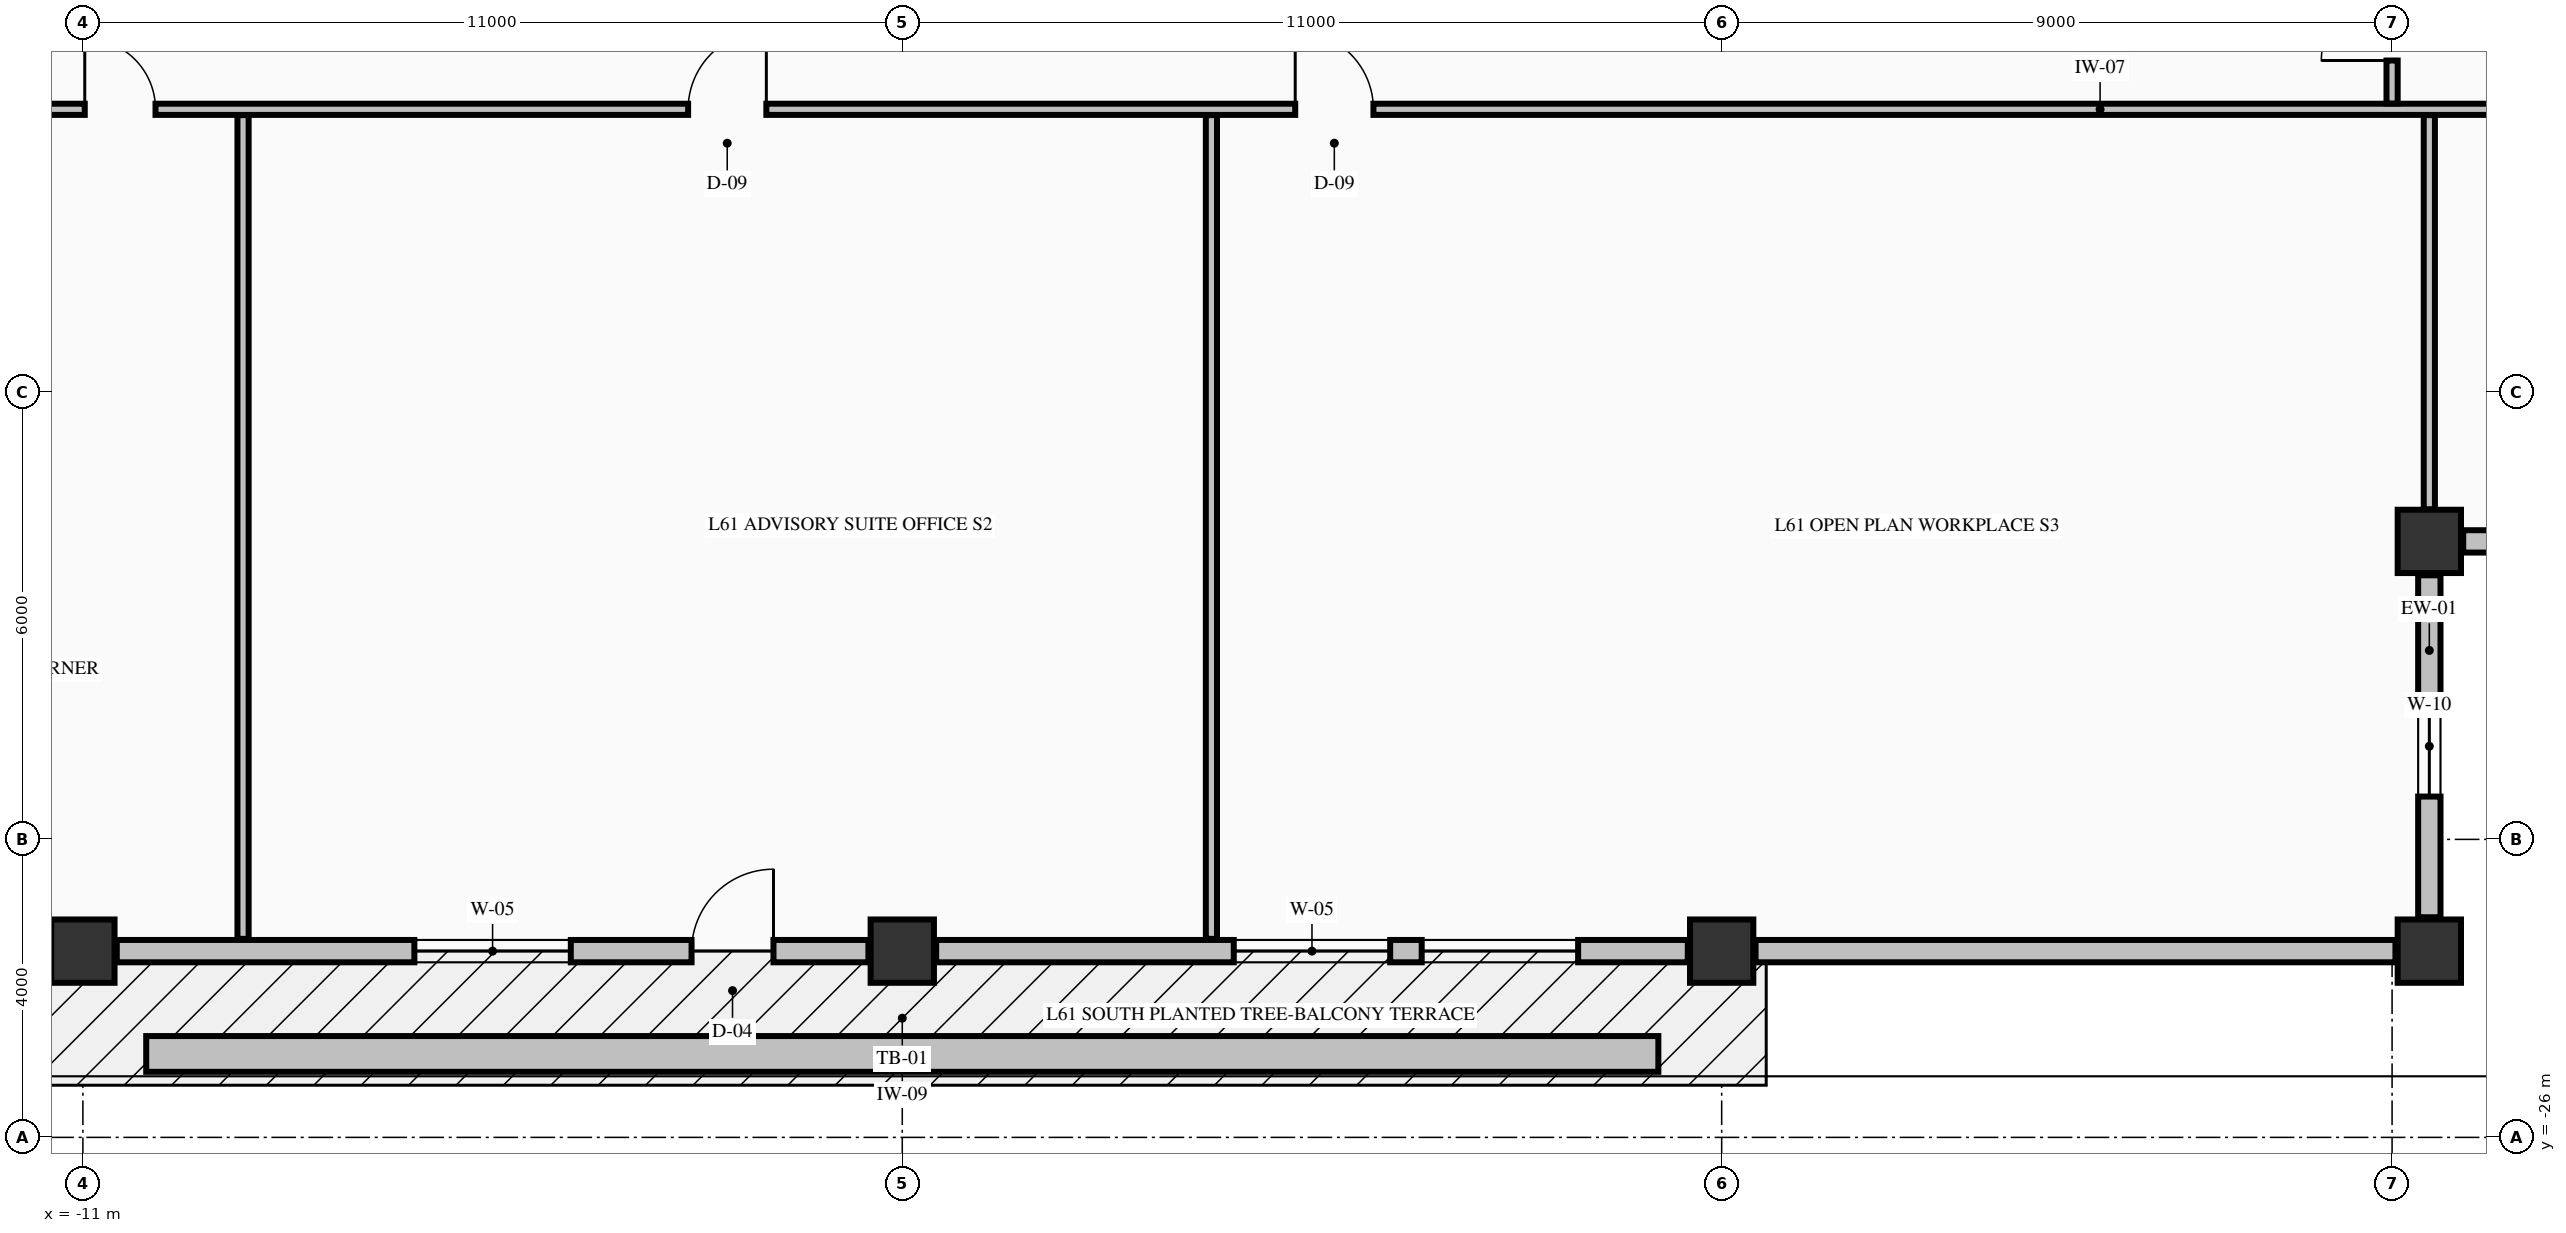
"""IFC4 building model, lengths in metres.
Left out: names, types, materials, properties, quantities, classifications, styles, units other than length and angle.
Written with IfcOpenShell. Run it as: python <this file> out.ifc"""

import sys

from ifc_helpers import new_model, si_unit, direction, frame, frame_2d, origin, origin_2d, place, context, subcontext, project, spatial, rectangle, extrude, element, fill, save


model = new_model("IFC4")
c1 = context("Model", 3, precision=1e-05, world=origin(), true_north=direction((0.0, 1.0)))
c2 = subcontext(c1, "Body", "Model", "MODEL_VIEW")
j1 = project(units=[si_unit("LENGTHUNIT", "METRE"), si_unit("PLANEANGLEUNIT", "RADIAN")], contexts=[c1])
p1 = place(None, origin())
s1 = spatial("IfcSite", under=j1, at=p1, CompositionType="ELEMENT")
p2 = place(p1, origin())
s2 = spatial("IfcBuilding", under=s1, at=p2, CompositionType="ELEMENT")
p3 = place(p2, frame((0.0, 0.0, 233.28)))
s3 = spatial("IfcBuildingStorey", under=s2, at=p3, CompositionType="ELEMENT", Elevation=233.28)
for number, where, z_axis, x_axis in (
    (1, (-11.0, -23.5, -0.25), (0.0, 0.0, 1.0), (1.0, 0.0, 0.0)),
    (2, (0.0, -23.5, -0.25), (0.0, 0.0, 1.0), (1.0, 0.0, 0.0)),
    (3, (11.0, -23.5, -0.25), (0.0, 0.0, 1.0), (1.0, 0.0, 0.0)),
    (4, (20.5, -23.5, -0.25), (0.0, 0.0, 1.0), (1.0, 0.0, 0.0)),
    (5, (20.5, -18.0, -0.25), (0.0, 0.0, 1.0), (1.0, 0.0, 0.0)),
):
    element("IfcColumn", number, at=place(p3, frame(where, z_axis=z_axis, x_axis=x_axis)), inside=s3, PredefinedType="COLUMN", context=c2, shape_type="SweptSolid", body=[
        extrude(rectangle(XDim=0.85, YDim=0.85, at=origin_2d()), origin(), (0.0, 0.0, 1.0), 3.23),
    ])
p4 = place(p3, frame((20.5, -23.045, 0.0), z_axis=(0.0, 0.0, 1.0), x_axis=(0.0, 1.0, 0.0)))
e6 = element("IfcWall", 6, at=p4, inside=s3, PredefinedType="STANDARD", context=c2, shape_type="SweptSolid", body=[
    extrude(rectangle(XDim=4.59, YDim=0.3, at=frame_2d((2.295, 0.0))), origin(), (0.0, 0.0, 1.0), 2.372),
])
p5 = place(p4, frame((1.62, 0.0, 0.68)))
e7 = element("IfcOpeningElement", 7, at=p5, cuts=e6, PredefinedType="OPENING", context=c2, shape_type="SweptSolid", body=[
    extrude(rectangle(XDim=1.35, YDim=1.42, at=frame_2d((0.675, 0.71))), frame((0.0, 0.16, 0.0), z_axis=(0.0, -1.0, 0.0), x_axis=(1.0, 0.0, 0.0)), (0.0, 0.0, 1.0), 0.32),
])
p6 = place(p3, frame((20.955, -18.0, 0.0), z_axis=(0.0, 0.0, 1.0), x_axis=(1.0, 0.0, 0.0)))
e8 = element("IfcWall", 8, at=p6, inside=s3, PredefinedType="STANDARD", context=c2, shape_type="SweptSolid", body=[
    extrude(rectangle(XDim=4.59, YDim=0.3, at=frame_2d((2.295, 0.0))), origin(), (0.0, 0.0, 1.0), 2.372),
])
p7 = place(p6, frame((1.62, 0.0, 0.68)))
e9 = element("IfcOpeningElement", 9, at=p7, cuts=e8, PredefinedType="OPENING", context=c2, shape_type="SweptSolid", body=[
    extrude(rectangle(XDim=1.35, YDim=1.42, at=frame_2d((0.675, 0.71))), frame((0.0, 0.16, 0.0), z_axis=(0.0, -1.0, 0.0), x_axis=(1.0, 0.0, 0.0)), (0.0, 0.0, 1.0), 0.32),
])
p8 = place(p3, frame((-10.545, -23.5, 0.0), z_axis=(0.0, 0.0, 1.0), x_axis=(1.0, 0.0, 0.0)))
e10 = element("IfcWall", 10, at=p8, inside=s3, PredefinedType="STANDARD", context=c2, shape_type="SweptSolid", body=[
    extrude(rectangle(XDim=10.09, YDim=0.3, at=frame_2d((5.045, 0.0))), origin(), (0.0, 0.0, 1.0), 2.372),
])
p9 = place(p8, frame((7.716, 0.0, 0.0)))
e11 = element("IfcOpeningElement", 11, at=p9, cuts=e10, PredefinedType="OPENING", context=c2, shape_type="SweptSolid", body=[
    extrude(rectangle(XDim=1.1, YDim=2.15, at=frame_2d((0.55, 1.075))), frame((0.0, 0.16, 0.0), z_axis=(0.0, -1.0, 0.0), x_axis=(1.0, 0.0, 0.0)), (0.0, 0.0, 1.0), 0.32),
])
p10 = place(p8, frame((3.995, 0.0, 0.7)))
e12 = element("IfcOpeningElement", 12, at=p10, cuts=e10, PredefinedType="OPENING", context=c2, shape_type="SweptSolid", body=[
    extrude(rectangle(XDim=2.1, YDim=1.5, at=frame_2d((1.05, 0.75))), frame((0.0, 0.16, 0.0), z_axis=(0.0, -1.0, 0.0), x_axis=(1.0, 0.0, 0.0)), (0.0, 0.0, 1.0), 0.32),
])
p11 = place(p3, frame((0.455, -23.5, 0.0), z_axis=(0.0, 0.0, 1.0), x_axis=(1.0, 0.0, 0.0)))
e13 = element("IfcWall", 13, at=p11, inside=s3, PredefinedType="STANDARD", context=c2, shape_type="SweptSolid", body=[
    extrude(rectangle(XDim=10.09, YDim=0.3, at=frame_2d((5.045, 0.0))), origin(), (0.0, 0.0, 1.0), 2.372),
])
p12 = place(p11, frame((3.995, 0.0, 0.7)))
e14 = element("IfcOpeningElement", 14, at=p12, cuts=e13, PredefinedType="OPENING", context=c2, shape_type="SweptSolid", body=[
    extrude(rectangle(XDim=2.1, YDim=1.5, at=frame_2d((1.05, 0.75))), frame((0.0, 0.16, 0.0), z_axis=(0.0, -1.0, 0.0), x_axis=(1.0, 0.0, 0.0)), (0.0, 0.0, 1.0), 0.32),
])
p13 = place(p11, frame((6.518, 0.0, 0.7)))
e15 = element("IfcOpeningElement", 15, at=p13, cuts=e13, PredefinedType="OPENING", context=c2, shape_type="SweptSolid", body=[
    extrude(rectangle(XDim=2.1, YDim=1.5, at=frame_2d((1.05, 0.75))), frame((0.0, 0.16, 0.0), z_axis=(0.0, -1.0, 0.0), x_axis=(1.0, 0.0, 0.0)), (0.0, 0.0, 1.0), 0.32),
])
p14 = place(p3, frame((11.455, -23.5, 0.0), z_axis=(0.0, 0.0, 1.0), x_axis=(1.0, 0.0, 0.0)))
e16 = element("IfcWall", 16, at=p14, inside=s3, PredefinedType="STANDARD", context=c2, shape_type="SweptSolid", body=[
    extrude(rectangle(XDim=8.59, YDim=0.3, at=frame_2d((4.295, 0.0))), origin(), (0.0, 0.0, 1.0), 2.372),
])
p15 = place(p3, frame((-20.075, -12.2, 0.0), z_axis=(0.0, 0.0, 1.0), x_axis=(1.0, 0.0, 0.0)))
e17 = element("IfcWall", 17, at=p15, inside=s3, PredefinedType="PARTITIONING", context=c2, shape_type="SweptSolid", body=[
    extrude(rectangle(XDim=45.91, YDim=0.15, at=frame_2d((22.955, 0.0))), origin(), (0.0, 0.0, 1.0), 2.98),
])
p16 = place(p15, frame((9.1, 0.0, 0.0)))
e18 = element("IfcOpeningElement", 18, at=p16, cuts=e17, PredefinedType="OPENING", context=c2, shape_type="SweptSolid", body=[
    extrude(rectangle(XDim=0.95, YDim=2.15, at=frame_2d((0.475, 1.075))), frame((0.0, 0.085, 0.0), z_axis=(0.0, -1.0, 0.0), x_axis=(1.0, 0.0, 0.0)), (0.0, 0.0, 1.0), 0.17),
])
p17 = place(p15, frame((17.2, 0.0, 0.0)))
e19 = element("IfcOpeningElement", 19, at=p17, cuts=e17, PredefinedType="OPENING", context=c2, shape_type="SweptSolid", body=[
    extrude(rectangle(XDim=1.05, YDim=2.15, at=frame_2d((0.525, 1.075))), frame((0.0, 0.085, 0.0), z_axis=(0.0, -1.0, 0.0), x_axis=(1.0, 0.0, 0.0)), (0.0, 0.0, 1.0), 0.17),
])
p18 = place(p15, frame((25.35, 0.0, 0.0)))
e20 = element("IfcOpeningElement", 20, at=p18, cuts=e17, PredefinedType="OPENING", context=c2, shape_type="SweptSolid", body=[
    extrude(rectangle(XDim=1.05, YDim=2.15, at=frame_2d((0.525, 1.075))), frame((0.0, 0.085, 0.0), z_axis=(0.0, -1.0, 0.0), x_axis=(1.0, 0.0, 0.0)), (0.0, 0.0, 1.0), 0.17),
])
for number, where, z_axis, x_axis in (
    (21, (-8.85, -23.335, 0.0), (0.0, 0.0, 1.0), (0.0, 1.0, 0.0)),
    (22, (4.15, -23.335, 0.0), (0.0, 0.0, 1.0), (0.0, 1.0, 0.0)),
):
    element("IfcWall", number, at=place(p3, frame(where, z_axis=z_axis, x_axis=x_axis)), inside=s3, PredefinedType="PARTITIONING", context=c2, shape_type="SweptSolid", body=[
        extrude(rectangle(XDim=11.057, YDim=0.15, at=frame_2d((5.528, 0.0))), origin(), (0.0, 0.0, 1.0), 2.98),
    ])
p19 = place(p3, frame((20.0, -12.122, 0.0), z_axis=(0.0, 0.0, 1.0), x_axis=(0.0, 1.0, 0.0)))
e23 = element("IfcWall", 23, at=p19, inside=s3, PredefinedType="PARTITIONING", context=c2, shape_type="SweptSolid", body=[
    extrude(rectangle(XDim=1.816, YDim=0.15, at=frame_2d((0.908, 0.0))), origin(), (0.0, 0.0, 1.0), 2.98),
])
p20 = place(p19, frame((0.577, 0.0, 0.0)))
e24 = element("IfcOpeningElement", 24, at=p20, cuts=e23, PredefinedType="OPENING", context=c2, shape_type="SweptSolid", body=[
    extrude(rectangle(XDim=0.95, YDim=2.15, at=frame_2d((0.475, 1.075))), frame((0.0, 0.085, 0.0), z_axis=(0.0, -1.0, 0.0), x_axis=(1.0, 0.0, 0.0)), (0.0, 0.0, 1.0), 0.17),
])
p21 = place(p3, frame((20.5, -17.569, 0.0), z_axis=(0.0, 0.0, 1.0), x_axis=(0.0, 1.0, 0.0)))
e25 = element("IfcWall", 25, at=p21, inside=s3, PredefinedType="PARTITIONING", context=c2, shape_type="SweptSolid", body=[
    extrude(rectangle(XDim=5.291, YDim=0.15, at=frame_2d((2.646, 0.0))), origin(), (0.0, 0.0, 1.0), 2.98),
])
p22 = place(p3, frame((-10.15, -24.88, -0.04), z_axis=(0.0, 0.0, 1.0), x_axis=(1.0, 0.0, 0.0)))
e26 = element("IfcWall", 26, at=p22, inside=s3, PredefinedType="PARAPET", context=c2, shape_type="SweptSolid", body=[
    extrude(rectangle(XDim=20.3, YDim=0.48, at=frame_2d((10.15, 0.0))), origin(), (0.0, 0.0, 1.0), 0.52),
])
p23 = place(p5, origin())
e27 = element("IfcWindow", 27, at=p23, inside=s3, PartitioningType="SINGLE_PANEL", PredefinedType="WINDOW", context=c2, shape_type="SweptSolid", body=[
    extrude(rectangle(XDim=1.35, YDim=1.42, at=frame_2d((0.675, 0.71))), frame((0.0, 0.03, 0.0), z_axis=(0.0, -1.0, 0.0), x_axis=(1.0, 0.0, 0.0)), (0.0, 0.0, 1.0), 0.06),
])
fill(e7, e27)
p24 = place(p9, origin())
e28 = element("IfcDoor", 28, at=p24, inside=s3, OperationType="SINGLE_SWING_RIGHT", PredefinedType="DOOR", context=c2, shape_type="SweptSolid", body=[
    extrude(rectangle(XDim=1.1, YDim=2.15, at=frame_2d((0.55, 1.075))), frame((0.0, 0.025, 0.0), z_axis=(0.0, -1.0, 0.0), x_axis=(1.0, 0.0, 0.0)), (0.0, 0.0, 1.0), 0.05),
])
fill(e11, e28)
p25 = place(p10, origin())
e29 = element("IfcWindow", 29, at=p25, inside=s3, PartitioningType="SINGLE_PANEL", PredefinedType="WINDOW", context=c2, shape_type="SweptSolid", body=[
    extrude(rectangle(XDim=2.1, YDim=1.5, at=frame_2d((1.05, 0.75))), frame((0.0, 0.03, 0.0), z_axis=(0.0, -1.0, 0.0), x_axis=(1.0, 0.0, 0.0)), (0.0, 0.0, 1.0), 0.06),
])
fill(e12, e29)
p26 = place(p12, origin())
e30 = element("IfcWindow", 30, at=p26, inside=s3, PartitioningType="SINGLE_PANEL", PredefinedType="WINDOW", context=c2, shape_type="SweptSolid", body=[
    extrude(rectangle(XDim=2.1, YDim=1.5, at=frame_2d((1.05, 0.75))), frame((0.0, 0.03, 0.0), z_axis=(0.0, -1.0, 0.0), x_axis=(1.0, 0.0, 0.0)), (0.0, 0.0, 1.0), 0.06),
])
fill(e14, e30)
p27 = place(p13, origin())
e31 = element("IfcWindow", 31, at=p27, inside=s3, PartitioningType="SINGLE_PANEL", PredefinedType="WINDOW", context=c2, shape_type="SweptSolid", body=[
    extrude(rectangle(XDim=2.1, YDim=1.5, at=frame_2d((1.05, 0.75))), frame((0.0, 0.03, 0.0), z_axis=(0.0, -1.0, 0.0), x_axis=(1.0, 0.0, 0.0)), (0.0, 0.0, 1.0), 0.06),
])
fill(e15, e31)
p28 = place(p16, origin())
e32 = element("IfcDoor", 32, at=p28, inside=s3, OperationType="SINGLE_SWING_LEFT", PredefinedType="DOOR", context=c2, shape_type="SweptSolid", body=[
    extrude(rectangle(XDim=0.95, YDim=2.15, at=frame_2d((0.475, 1.075))), frame((0.0, 0.025, 0.0), z_axis=(0.0, -1.0, 0.0), x_axis=(1.0, 0.0, 0.0)), (0.0, 0.0, 1.0), 0.05),
])
fill(e18, e32)
p29 = place(p17, origin())
e33 = element("IfcDoor", 33, at=p29, inside=s3, OperationType="SINGLE_SWING_RIGHT", PredefinedType="DOOR", context=c2, shape_type="SweptSolid", body=[
    extrude(rectangle(XDim=1.05, YDim=2.15, at=frame_2d((0.525, 1.075))), frame((0.0, 0.025, 0.0), z_axis=(0.0, -1.0, 0.0), x_axis=(1.0, 0.0, 0.0)), (0.0, 0.0, 1.0), 0.05),
])
fill(e19, e33)
p30 = place(p18, origin())
e34 = element("IfcDoor", 34, at=p30, inside=s3, OperationType="SINGLE_SWING_LEFT", PredefinedType="DOOR", context=c2, shape_type="SweptSolid", body=[
    extrude(rectangle(XDim=1.05, YDim=2.15, at=frame_2d((0.525, 1.075))), frame((0.0, 0.025, 0.0), z_axis=(0.0, -1.0, 0.0), x_axis=(1.0, 0.0, 0.0)), (0.0, 0.0, 1.0), 0.05),
])
fill(e20, e34)
p31 = place(p20, origin())
e35 = element("IfcDoor", 35, at=p31, inside=s3, OperationType="SINGLE_SWING_LEFT", PredefinedType="DOOR", context=c2, shape_type="SweptSolid", body=[
    extrude(rectangle(XDim=0.95, YDim=2.15, at=frame_2d((0.475, 1.075))), frame((0.0, 0.025, 0.0), z_axis=(0.0, -1.0, 0.0), x_axis=(1.0, 0.0, 0.0)), (0.0, 0.0, 1.0), 0.05),
])
fill(e24, e35)
save(model, sys.argv[1])
